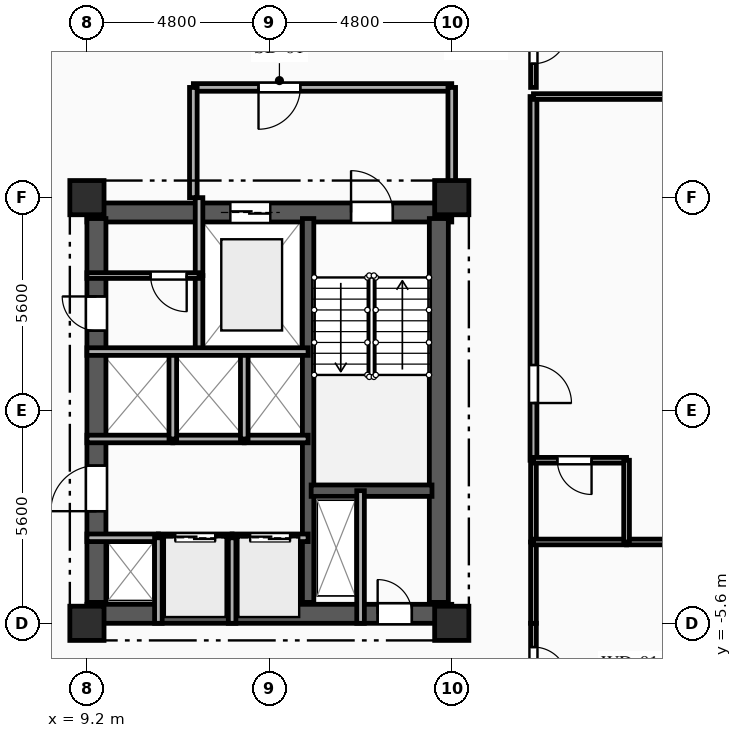
"""IFC4 building model, lengths in metres.
Left out: names, types, materials, properties, quantities, classifications, styles, units other than length and angle.
Written with IfcOpenShell. Run it as: python <this file> out.ifc"""

import sys

from ifc_helpers import new_model, si_unit, direction, frame, frame_2d, origin, origin_2d, place, context, subcontext, project, spatial, rectangle, extrude, element, fill, save


model = new_model("IFC4")
c1 = context("Model", 3, precision=1e-05, world=origin(), true_north=direction((0.0, 1.0)))
c2 = subcontext(c1, "Body", "Model", "MODEL_VIEW")
j1 = project(units=[si_unit("LENGTHUNIT", "METRE"), si_unit("PLANEANGLEUNIT", "RADIAN")], contexts=[c1])
p1 = place(None, origin())
s1 = spatial("IfcSite", under=j1, at=p1, CompositionType="ELEMENT")
p2 = place(p1, origin())
s2 = spatial("IfcBuilding", under=s1, at=p2, CompositionType="ELEMENT")
p3 = place(p2, frame((0.0, 0.0, 154.45)))
s3 = spatial("IfcBuildingStorey", under=s2, at=p3, CompositionType="ELEMENT", Elevation=154.45)
for number, where, z_axis, x_axis in (
    (1, (9.2, -5.6, 0.0), (0.0, 0.0, 1.0), (1.0, 0.0, 0.0)),
    (2, (9.2, 5.6, 0.0), (0.0, 0.0, 1.0), (1.0, 0.0, 0.0)),
    (3, (18.8, -5.6, 0.0), (0.0, 0.0, 1.0), (1.0, 0.0, 0.0)),
    (4, (18.8, 5.6, 0.0), (0.0, 0.0, 1.0), (1.0, 0.0, 0.0)),
):
    element("IfcColumn", number, at=place(p3, frame(where, z_axis=z_axis, x_axis=x_axis)), inside=s3, PredefinedType="COLUMN", context=c2, shape_type="SweptSolid", body=[
        extrude(rectangle(XDim=0.9, YDim=0.9, at=origin_2d()), origin(), (0.0, 0.0, 1.0), 3.35),
    ])
p4 = place(p3, frame((9.2, 5.21, 0.0), z_axis=(0.0, 0.0, 1.0), x_axis=(1.0, 0.0, 0.0)))
e5 = element("IfcWall", 5, at=p4, inside=s3, PredefinedType="SHEAR", context=c2, shape_type="SweptSolid", body=[
    extrude(rectangle(XDim=9.6, YDim=0.5, at=frame_2d((4.8, 0.0))), origin(), (0.0, 0.0, 1.0), 3.04),
])
p5 = place(p4, frame((6.95, 0.0, 0.0)))
e6 = element("IfcOpeningElement", 6, at=p5, cuts=e5, PredefinedType="OPENING", context=c2, shape_type="SweptSolid", body=[
    extrude(rectangle(XDim=1.1, YDim=2.15, at=frame_2d((0.55, 1.075))), frame((0.0, 0.26, 0.0), z_axis=(0.0, -1.0, 0.0), x_axis=(1.0, 0.0, 0.0)), (0.0, 0.0, 1.0), 0.52),
])
p6 = place(p4, frame((3.775, 0.0, 0.0)))
e7 = element("IfcOpeningElement", 7, at=p6, cuts=e5, PredefinedType="OPENING", context=c2, shape_type="SweptSolid", body=[
    extrude(rectangle(XDim=1.05, YDim=2.1, at=frame_2d((0.525, 1.05))), frame((0.0, 0.26, 0.0), z_axis=(0.0, -1.0, 0.0), x_axis=(1.0, 0.0, 0.0)), (0.0, 0.0, 1.0), 0.52),
])
p7 = place(p3, frame((9.2, -5.35, 0.0), z_axis=(0.0, 0.0, 1.0), x_axis=(1.0, 0.0, 0.0)))
e8 = element("IfcWall", 8, at=p7, inside=s3, PredefinedType="SHEAR", context=c2, shape_type="SweptSolid", body=[
    extrude(rectangle(XDim=9.6, YDim=0.5, at=frame_2d((4.8, 0.0))), origin(), (0.0, 0.0, 1.0), 3.04),
])
p8 = place(p7, frame((7.65, 0.0, 0.0)))
e9 = element("IfcOpeningElement", 9, at=p8, cuts=e8, PredefinedType="OPENING", context=c2, shape_type="SweptSolid", body=[
    extrude(rectangle(XDim=0.9, YDim=2.1, at=frame_2d((0.45, 1.05))), frame((0.0, 0.26, 0.0), z_axis=(0.0, -1.0, 0.0), x_axis=(1.0, 0.0, 0.0)), (0.0, 0.0, 1.0), 0.52),
])
p9 = place(p3, frame((9.45, -5.05, 0.0), z_axis=(0.0, 0.0, 1.0), x_axis=(0.0, 1.0, 0.0)))
e10 = element("IfcWall", 10, at=p9, inside=s3, PredefinedType="SHEAR", context=c2, shape_type="SweptSolid", body=[
    extrude(rectangle(XDim=10.1, YDim=0.5, at=frame_2d((5.05, 0.0))), origin(), (0.0, 0.0, 1.0), 3.04),
])
p10 = place(p9, frame((7.15, 0.0, 0.0)))
e11 = element("IfcOpeningElement", 11, at=p10, cuts=e10, PredefinedType="OPENING", context=c2, shape_type="SweptSolid", body=[
    extrude(rectangle(XDim=0.9, YDim=2.1, at=frame_2d((0.45, 1.05))), frame((0.0, 0.26, 0.0), z_axis=(0.0, -1.0, 0.0), x_axis=(1.0, 0.0, 0.0)), (0.0, 0.0, 1.0), 0.52),
])
p11 = place(p9, frame((2.4, 0.0, 0.0)))
e12 = element("IfcOpeningElement", 12, at=p11, cuts=e10, PredefinedType="OPENING", context=c2, shape_type="SweptSolid", body=[
    extrude(rectangle(XDim=1.2, YDim=2.15, at=frame_2d((0.6, 1.075))), frame((0.0, 0.26, 0.0), z_axis=(0.0, -1.0, 0.0), x_axis=(1.0, 0.0, 0.0)), (0.0, 0.0, 1.0), 0.52),
])
p12 = place(p3, frame((18.46, -5.05, 0.0), z_axis=(0.0, 0.0, 1.0), x_axis=(0.0, 1.0, 0.0)))
e13 = element("IfcWall", 13, at=p12, inside=s3, PredefinedType="SHEAR", context=c2, shape_type="SweptSolid", body=[
    extrude(rectangle(XDim=10.1, YDim=0.5, at=frame_2d((5.05, 0.0))), origin(), (0.0, 0.0, 1.0), 3.04),
])
p13 = place(p3, frame((15.02, -5.05, 0.0), z_axis=(0.0, 0.0, 1.0), x_axis=(0.0, 1.0, 0.0)))
e14 = element("IfcWall", 14, at=p13, inside=s3, PredefinedType="SHEAR", context=c2, shape_type="SweptSolid", body=[
    extrude(rectangle(XDim=10.1, YDim=0.3, at=frame_2d((5.05, 0.0))), origin(), (0.0, 0.0, 1.0), 3.04),
])
p14 = place(p3, frame((15.1, -2.11, 0.0), z_axis=(0.0, 0.0, 1.0), x_axis=(1.0, 0.0, 0.0)))
e15 = element("IfcWall", 15, at=p14, inside=s3, PredefinedType="SHEAR", context=c2, shape_type="SweptSolid", body=[
    extrude(rectangle(XDim=3.18, YDim=0.3, at=frame_2d((1.59, 0.0))), origin(), (0.0, 0.0, 1.0), 3.04),
])
p15 = place(p3, frame((16.4, -2.11, 0.0), z_axis=(0.0, 0.0, 1.0), x_axis=(0.0, -1.0, 0.0)))
e16 = element("IfcWall", 16, at=p15, inside=s3, PredefinedType="PARTITIONING", context=c2, shape_type="SweptSolid", body=[
    extrude(rectangle(XDim=3.49, YDim=0.2, at=frame_2d((1.745, 0.0))), origin(), (0.0, 0.0, 1.0), 3.04),
])
p16 = place(p3, frame((12.15, 3.55, 0.0), z_axis=(0.0, 0.0, 1.0), x_axis=(0.0, -1.0, 0.0)))
e17 = element("IfcWall", 17, at=p16, inside=s3, PredefinedType="PARTITIONING", context=c2, shape_type="SweptSolid", body=[
    extrude(rectangle(XDim=2.0, YDim=0.2, at=frame_2d((1.0, 0.0))), origin(), (0.0, 0.0, 1.0), 3.04),
])
p17 = place(p3, frame((12.15, 5.6, 0.0), z_axis=(0.0, 0.0, 1.0), x_axis=(0.0, -1.0, 0.0)))
e18 = element("IfcWall", 18, at=p17, inside=s3, PredefinedType="PARTITIONING", context=c2, shape_type="SweptSolid", body=[
    extrude(rectangle(XDim=2.05, YDim=0.2, at=frame_2d((1.025, 0.0))), origin(), (0.0, 0.0, 1.0), 3.04),
])
p18 = place(p3, frame((18.8, 8.5, 0.0), z_axis=(0.0, 0.0, 1.0), x_axis=(-1.0, 0.0, 0.0)))
e19 = element("IfcWall", 19, at=p18, inside=s3, PredefinedType="PARTITIONING", context=c2, shape_type="SweptSolid", body=[
    extrude(rectangle(XDim=6.8, YDim=0.2, at=frame_2d((3.4, 0.0))), origin(), (0.0, 0.0, 1.0), 3.04),
])
p19 = place(p18, frame((3.985, 0.0, 0.0)))
e20 = element("IfcOpeningElement", 20, at=p19, cuts=e19, PredefinedType="OPENING", context=c2, shape_type="SweptSolid", body=[
    extrude(rectangle(XDim=1.1, YDim=2.15, at=frame_2d((0.55, 1.075))), frame((0.0, 0.11, 0.0), z_axis=(0.0, -1.0, 0.0), x_axis=(1.0, 0.0, 0.0)), (0.0, 0.0, 1.0), 0.22),
])
p20 = place(p3, frame((18.8, 5.6, 0.0), z_axis=(0.0, 0.0, 1.0), x_axis=(0.0, 1.0, 0.0)))
e21 = element("IfcWall", 21, at=p20, inside=s3, PredefinedType="PARTITIONING", context=c2, shape_type="SweptSolid", body=[
    extrude(rectangle(XDim=2.9, YDim=0.2, at=frame_2d((1.45, 0.0))), origin(), (0.0, 0.0, 1.0), 2.525),
])
p21 = place(p3, frame((12.0, 8.5, 0.0), z_axis=(0.0, 0.0, 1.0), x_axis=(0.0, -1.0, 0.0)))
e22 = element("IfcWall", 22, at=p21, inside=s3, PredefinedType="PARTITIONING", context=c2, shape_type="SweptSolid", body=[
    extrude(rectangle(XDim=2.9, YDim=0.2, at=frame_2d((1.45, 0.0))), origin(), (0.0, 0.0, 1.0), 3.04),
])
p22 = place(p3, frame((12.15, 3.55, 0.0), z_axis=(0.0, 0.0, 1.0), x_axis=(-1.0, 0.0, 0.0)))
e23 = element("IfcWall", 23, at=p22, inside=s3, PredefinedType="PARTITIONING", context=c2, shape_type="SweptSolid", body=[
    extrude(rectangle(XDim=2.95, YDim=0.15, at=frame_2d((1.475, 0.0))), origin(), (0.0, 0.0, 1.0), 3.04),
])
p23 = place(p22, frame((0.325, 0.0, 0.0)))
e24 = element("IfcOpeningElement", 24, at=p23, cuts=e23, PredefinedType="OPENING", context=c2, shape_type="SweptSolid", body=[
    extrude(rectangle(XDim=0.95, YDim=2.1, at=frame_2d((0.475, 1.05))), frame((0.0, 0.085, 0.0), z_axis=(0.0, -1.0, 0.0), x_axis=(1.0, 0.0, 0.0)), (0.0, 0.0, 1.0), 0.17),
])
p24 = place(p3, frame((9.2, -3.35, 0.0), z_axis=(0.0, 0.0, 1.0), x_axis=(1.0, 0.0, 0.0)))
e25 = element("IfcWall", 25, at=p24, inside=s3, PredefinedType="PARTITIONING", context=c2, shape_type="SweptSolid", body=[
    extrude(rectangle(XDim=1.88, YDim=0.2, at=frame_2d((0.94, 0.0))), origin(), (0.0, 0.0, 1.0), 2.755),
])
p25 = place(p3, frame((11.08, -3.35, 0.0), z_axis=(0.0, 0.0, 1.0), x_axis=(1.0, 0.0, 0.0)))
e26 = element("IfcWall", 26, at=p25, inside=s3, PredefinedType="PARTITIONING", context=c2, shape_type="SweptSolid", body=[
    extrude(rectangle(XDim=1.94, YDim=0.2, at=frame_2d((0.97, 0.0))), origin(), (0.0, 0.0, 1.0), 3.04),
])
p26 = place(p25, frame((0.445, 0.0, 0.0)))
e27 = element("IfcOpeningElement", 27, at=p26, cuts=e26, PredefinedType="OPENING", context=c2, shape_type="SweptSolid", body=[
    extrude(rectangle(XDim=1.05, YDim=2.1, at=frame_2d((0.525, 1.05))), frame((0.0, 0.11, 0.0), z_axis=(0.0, -1.0, 0.0), x_axis=(1.0, 0.0, 0.0)), (0.0, 0.0, 1.0), 0.22),
])
p27 = place(p3, frame((13.02, -3.35, 0.0), z_axis=(0.0, 0.0, 1.0), x_axis=(1.0, 0.0, 0.0)))
e28 = element("IfcWall", 28, at=p27, inside=s3, PredefinedType="PARTITIONING", context=c2, shape_type="SweptSolid", body=[
    extrude(rectangle(XDim=2.0, YDim=0.2, at=frame_2d((1.0, 0.0))), origin(), (0.0, 0.0, 1.0), 3.04),
])
p28 = place(p27, frame((0.475, 0.0, 0.0)))
e29 = element("IfcOpeningElement", 29, at=p28, cuts=e28, PredefinedType="OPENING", context=c2, shape_type="SweptSolid", body=[
    extrude(rectangle(XDim=1.05, YDim=2.1, at=frame_2d((0.525, 1.05))), frame((0.0, 0.11, 0.0), z_axis=(0.0, -1.0, 0.0), x_axis=(1.0, 0.0, 0.0)), (0.0, 0.0, 1.0), 0.22),
])
p29 = place(p3, frame((11.46, -0.75, 0.0), z_axis=(0.0, 0.0, 1.0), x_axis=(-1.0, 0.0, 0.0)))
e30 = element("IfcWall", 30, at=p29, inside=s3, PredefinedType="PARTITIONING", context=c2, shape_type="SweptSolid", body=[
    extrude(rectangle(XDim=2.26, YDim=0.2, at=frame_2d((1.13, 0.0))), origin(), (0.0, 0.0, 1.0), 3.04),
])
p30 = place(p3, frame((13.34, -0.75, 0.0), z_axis=(0.0, 0.0, 1.0), x_axis=(-1.0, 0.0, 0.0)))
e31 = element("IfcWall", 31, at=p30, inside=s3, PredefinedType="PARTITIONING", context=c2, shape_type="SweptSolid", body=[
    extrude(rectangle(XDim=1.88, YDim=0.2, at=frame_2d((0.94, 0.0))), origin(), (0.0, 0.0, 1.0), 3.04),
])
p31 = place(p3, frame((15.02, -0.75, 0.0), z_axis=(0.0, 0.0, 1.0), x_axis=(-1.0, 0.0, 0.0)))
e32 = element("IfcWall", 32, at=p31, inside=s3, PredefinedType="PARTITIONING", context=c2, shape_type="SweptSolid", body=[
    extrude(rectangle(XDim=1.68, YDim=0.2, at=frame_2d((0.84, 0.0))), origin(), (0.0, 0.0, 1.0), 3.04),
])
for number, where, z_axis, x_axis in (
    (33, (11.08, -5.6, 0.0), (0.0, 0.0, 1.0), (0.0, 1.0, 0.0)),
    (34, (13.02, -5.6, 0.0), (0.0, 0.0, 1.0), (0.0, 1.0, 0.0)),
):
    element("IfcWall", number, at=place(p3, frame(where, z_axis=z_axis, x_axis=x_axis)), inside=s3, PredefinedType="PARTITIONING", context=c2, shape_type="SweptSolid", body=[
        extrude(rectangle(XDim=2.25, YDim=0.2, at=frame_2d((1.125, 0.0))), origin(), (0.0, 0.0, 1.0), 3.04),
    ])
for number, where, z_axis, x_axis in (
    (35, (11.46, -0.75, 0.0), (0.0, 0.0, 1.0), (0.0, 1.0, 0.0)),
    (36, (13.34, -0.75, 0.0), (0.0, 0.0, 1.0), (0.0, 1.0, 0.0)),
):
    element("IfcWall", number, at=place(p3, frame(where, z_axis=z_axis, x_axis=x_axis)), inside=s3, PredefinedType="PARTITIONING", context=c2, shape_type="SweptSolid", body=[
        extrude(rectangle(XDim=2.3, YDim=0.2, at=frame_2d((1.15, 0.0))), origin(), (0.0, 0.0, 1.0), 3.04),
    ])
p32 = place(p3, frame((20.95, 10.65, 0.0), z_axis=(0.0, 0.0, 1.0), x_axis=(0.0, -1.0, 0.0)))
e37 = element("IfcWall", 37, at=p32, inside=s3, PredefinedType="PARTITIONING", context=c2, shape_type="SweptSolid", body=[
    extrude(rectangle(XDim=2.15, YDim=0.15, at=frame_2d((1.075, 0.0))), origin(), (0.0, 0.0, 1.0), 3.04),
])
p33 = place(p32, frame((0.625, 0.0, 0.0)))
e38 = element("IfcOpeningElement", 38, at=p33, cuts=e37, PredefinedType="OPENING", context=c2, shape_type="SweptSolid", body=[
    extrude(rectangle(XDim=0.9, YDim=2.1, at=frame_2d((0.45, 1.05))), frame((0.0, 0.085, 0.0), z_axis=(0.0, -1.0, 0.0), x_axis=(1.0, 0.0, 0.0)), (0.0, 0.0, 1.0), 0.17),
])
p34 = place(p3, frame((20.95, -5.6, 0.0), z_axis=(0.0, 0.0, 1.0), x_axis=(0.0, -1.0, 0.0)))
e39 = element("IfcWall", 39, at=p34, inside=s3, PredefinedType="PARTITIONING", context=c2, shape_type="SweptSolid", body=[
    extrude(rectangle(XDim=2.15, YDim=0.15, at=frame_2d((1.075, 0.0))), origin(), (0.0, 0.0, 1.0), 3.04),
])
p35 = place(p34, frame((0.625, 0.0, 0.0)))
e40 = element("IfcOpeningElement", 40, at=p35, cuts=e39, PredefinedType="OPENING", context=c2, shape_type="SweptSolid", body=[
    extrude(rectangle(XDim=0.9, YDim=2.1, at=frame_2d((0.45, 1.05))), frame((0.0, 0.085, 0.0), z_axis=(0.0, -1.0, 0.0), x_axis=(1.0, 0.0, 0.0)), (0.0, 0.0, 1.0), 0.17),
])
p36 = place(p3, frame((20.95, -3.46, 0.0), z_axis=(0.0, 0.0, 1.0), x_axis=(0.0, -1.0, 0.0)))
e41 = element("IfcWall", 41, at=p36, inside=s3, PredefinedType="PARTITIONING", context=c2, shape_type="SweptSolid", body=[
    extrude(rectangle(XDim=2.14, YDim=0.15, at=frame_2d((1.07, 0.0))), origin(), (0.0, 0.0, 1.0), 3.04),
])
p37 = place(p3, frame((20.95, 8.26, 0.0), z_axis=(0.0, 0.0, 1.0), x_axis=(0.0, -1.0, 0.0)))
e42 = element("IfcWall", 42, at=p37, inside=s3, PredefinedType="PARTITIONING", context=c2, shape_type="SweptSolid", body=[
    extrude(rectangle(XDim=9.57, YDim=0.18, at=frame_2d((4.785, 0.0))), origin(), (0.0, 0.0, 1.0), 3.04),
])
p38 = place(p37, frame((7.064, 0.0, 0.0)))
e43 = element("IfcOpeningElement", 43, at=p38, cuts=e42, PredefinedType="OPENING", context=c2, shape_type="SweptSolid", body=[
    extrude(rectangle(XDim=1.0, YDim=2.15, at=frame_2d((0.5, 1.075))), frame((0.0, 0.1, 0.0), z_axis=(0.0, -1.0, 0.0), x_axis=(1.0, 0.0, 0.0)), (0.0, 0.0, 1.0), 0.2),
])
p39 = place(p3, frame((20.95, -1.31, 0.0), z_axis=(0.0, 0.0, 1.0), x_axis=(0.0, -1.0, 0.0)))
e44 = element("IfcWall", 44, at=p39, inside=s3, PredefinedType="PLUMBINGWALL", context=c2, shape_type="SweptSolid", body=[
    extrude(rectangle(XDim=2.15, YDim=0.15, at=frame_2d((1.075, 0.0))), origin(), (0.0, 0.0, 1.0), 3.04),
])
p40 = place(p3, frame((23.4, -3.46, 0.0), z_axis=(0.0, 0.0, 1.0), x_axis=(1.0, 0.0, 0.0)))
e45 = element("IfcWall", 45, at=p40, inside=s3, PredefinedType="PARTITIONING", context=c2, shape_type="SweptSolid", body=[
    extrude(rectangle(XDim=3.6, YDim=0.15, at=frame_2d((1.8, 0.0))), origin(), (0.0, 0.0, 1.0), 3.04),
])
p41 = place(p3, frame((20.95, -3.46, 0.0), z_axis=(0.0, 0.0, 1.0), x_axis=(1.0, 0.0, 0.0)))
e46 = element("IfcWall", 46, at=p41, inside=s3, PredefinedType="PLUMBINGWALL", context=c2, shape_type="SweptSolid", body=[
    extrude(rectangle(XDim=2.45, YDim=0.15, at=frame_2d((1.225, 0.0))), origin(), (0.0, 0.0, 1.0), 3.04),
])
p42 = place(p3, frame((23.4, -1.31, 0.0), z_axis=(0.0, 0.0, 1.0), x_axis=(-1.0, 0.0, 0.0)))
e47 = element("IfcWall", 47, at=p42, inside=s3, PredefinedType="PLUMBINGWALL", context=c2, shape_type="SweptSolid", body=[
    extrude(rectangle(XDim=2.45, YDim=0.15, at=frame_2d((1.225, 0.0))), origin(), (0.0, 0.0, 1.0), 3.04),
])
p43 = place(p42, frame((0.921, 0.0, 0.0)))
e48 = element("IfcOpeningElement", 48, at=p43, cuts=e47, PredefinedType="OPENING", context=c2, shape_type="SweptSolid", body=[
    extrude(rectangle(XDim=0.9, YDim=2.1, at=frame_2d((0.45, 1.05))), frame((0.0, 0.085, 0.0), z_axis=(0.0, -1.0, 0.0), x_axis=(1.0, 0.0, 0.0)), (0.0, 0.0, 1.0), 0.17),
])
p44 = place(p3, frame((23.4, -3.46, 0.0), z_axis=(0.0, 0.0, 1.0), x_axis=(0.0, 1.0, 0.0)))
e49 = element("IfcWall", 49, at=p44, inside=s3, PredefinedType="PLUMBINGWALL", context=c2, shape_type="SweptSolid", body=[
    extrude(rectangle(XDim=2.15, YDim=0.15, at=frame_2d((1.075, 0.0))), origin(), (0.0, 0.0, 1.0), 3.04),
])
p45 = place(p3, frame((20.95, 8.26, 0.0), z_axis=(0.0, 0.0, 1.0), x_axis=(1.0, 0.0, 0.0)))
e50 = element("IfcWall", 50, at=p45, inside=s3, PredefinedType="PARTITIONING", context=c2, shape_type="SweptSolid", body=[
    extrude(rectangle(XDim=6.05, YDim=0.15, at=frame_2d((3.025, 0.0))), origin(), (0.0, 0.0, 1.0), 3.04),
])
p46 = place(p3, frame((9.2, 1.55, 0.0), z_axis=(0.0, 0.0, 1.0), x_axis=(1.0, 0.0, 0.0)))
e51 = element("IfcWall", 51, at=p46, inside=s3, PredefinedType="PARTITIONING", context=c2, shape_type="SweptSolid", body=[
    extrude(rectangle(XDim=5.82, YDim=0.2, at=frame_2d((2.91, 0.0))), origin(), (0.0, 0.0, 1.0), 3.04),
])
p47 = place(p5, origin())
e52 = element("IfcDoor", 52, at=p47, inside=s3, OperationType="SINGLE_SWING_LEFT", PredefinedType="DOOR", context=c2, shape_type="SweptSolid", body=[
    extrude(rectangle(XDim=1.1, YDim=2.15, at=frame_2d((0.55, 1.075))), frame((0.0, 0.025, 0.0), z_axis=(0.0, -1.0, 0.0), x_axis=(1.0, 0.0, 0.0)), (0.0, 0.0, 1.0), 0.05),
])
fill(e6, e52)
p48 = place(p6, origin())
e53 = element("IfcDoor", 53, at=p48, inside=s3, OperationType="DOUBLE_DOOR_SLIDING", PredefinedType="DOOR", context=c2, shape_type="SweptSolid", body=[
    extrude(rectangle(XDim=1.05, YDim=2.1, at=frame_2d((0.525, 1.05))), frame((0.0, 0.025, 0.0), z_axis=(0.0, -1.0, 0.0), x_axis=(1.0, 0.0, 0.0)), (0.0, 0.0, 1.0), 0.05),
])
fill(e7, e53)
p49 = place(p8, origin())
e54 = element("IfcDoor", 54, at=p49, inside=s3, OperationType="SINGLE_SWING_LEFT", PredefinedType="DOOR", context=c2, shape_type="SweptSolid", body=[
    extrude(rectangle(XDim=0.9, YDim=2.1, at=frame_2d((0.45, 1.05))), frame((0.0, 0.025, 0.0), z_axis=(0.0, -1.0, 0.0), x_axis=(1.0, 0.0, 0.0)), (0.0, 0.0, 1.0), 0.05),
])
fill(e9, e54)
p50 = place(p19, origin())
e55 = element("IfcDoor", 55, at=p50, inside=s3, OperationType="SINGLE_SWING_RIGHT", PredefinedType="DOOR", context=c2, shape_type="SweptSolid", body=[
    extrude(rectangle(XDim=1.1, YDim=2.15, at=frame_2d((0.55, 1.075))), frame((0.0, 0.025, 0.0), z_axis=(0.0, -1.0, 0.0), x_axis=(1.0, 0.0, 0.0)), (0.0, 0.0, 1.0), 0.05),
])
fill(e20, e55)
p51 = place(p23, origin())
e56 = element("IfcDoor", 56, at=p51, inside=s3, OperationType="SINGLE_SWING_LEFT", PredefinedType="DOOR", context=c2, shape_type="SweptSolid", body=[
    extrude(rectangle(XDim=0.95, YDim=2.1, at=frame_2d((0.475, 1.05))), frame((0.0, 0.025, 0.0), z_axis=(0.0, -1.0, 0.0), x_axis=(1.0, 0.0, 0.0)), (0.0, 0.0, 1.0), 0.05),
])
fill(e24, e56)
p52 = place(p10, origin())
e57 = element("IfcDoor", 57, at=p52, inside=s3, OperationType="SINGLE_SWING_RIGHT", PredefinedType="DOOR", context=c2, shape_type="SweptSolid", body=[
    extrude(rectangle(XDim=0.9, YDim=2.1, at=frame_2d((0.45, 1.05))), frame((0.0, 0.025, 0.0), z_axis=(0.0, -1.0, 0.0), x_axis=(1.0, 0.0, 0.0)), (0.0, 0.0, 1.0), 0.05),
])
fill(e11, e57)
p53 = place(p26, origin())
e58 = element("IfcDoor", 58, at=p53, inside=s3, OperationType="DOUBLE_DOOR_SLIDING", PredefinedType="DOOR", context=c2, shape_type="SweptSolid", body=[
    extrude(rectangle(XDim=1.05, YDim=2.1, at=frame_2d((0.525, 1.05))), frame((0.0, 0.025, 0.0), z_axis=(0.0, -1.0, 0.0), x_axis=(1.0, 0.0, 0.0)), (0.0, 0.0, 1.0), 0.05),
])
fill(e27, e58)
p54 = place(p28, origin())
e59 = element("IfcDoor", 59, at=p54, inside=s3, OperationType="DOUBLE_DOOR_SLIDING", PredefinedType="DOOR", context=c2, shape_type="SweptSolid", body=[
    extrude(rectangle(XDim=1.05, YDim=2.1, at=frame_2d((0.525, 1.05))), frame((0.0, 0.025, 0.0), z_axis=(0.0, -1.0, 0.0), x_axis=(1.0, 0.0, 0.0)), (0.0, 0.0, 1.0), 0.05),
])
fill(e29, e59)
p55 = place(p11, origin())
e60 = element("IfcDoor", 60, at=p55, inside=s3, OperationType="SINGLE_SWING_LEFT", PredefinedType="DOOR", context=c2, shape_type="SweptSolid", body=[
    extrude(rectangle(XDim=1.2, YDim=2.15, at=frame_2d((0.6, 1.075))), frame((0.0, 0.025, 0.0), z_axis=(0.0, -1.0, 0.0), x_axis=(1.0, 0.0, 0.0)), (0.0, 0.0, 1.0), 0.05),
])
fill(e12, e60)
p56 = place(p33, origin())
e61 = element("IfcDoor", 61, at=p56, inside=s3, OperationType="SINGLE_SWING_LEFT", PredefinedType="DOOR", context=c2, shape_type="SweptSolid", body=[
    extrude(rectangle(XDim=0.9, YDim=2.1, at=frame_2d((0.45, 1.05))), frame((0.0, 0.025, 0.0), z_axis=(0.0, -1.0, 0.0), x_axis=(1.0, 0.0, 0.0)), (0.0, 0.0, 1.0), 0.05),
])
fill(e38, e61)
p57 = place(p35, origin())
e62 = element("IfcDoor", 62, at=p57, inside=s3, OperationType="SINGLE_SWING_RIGHT", PredefinedType="DOOR", context=c2, shape_type="SweptSolid", body=[
    extrude(rectangle(XDim=0.9, YDim=2.1, at=frame_2d((0.45, 1.05))), frame((0.0, 0.025, 0.0), z_axis=(0.0, -1.0, 0.0), x_axis=(1.0, 0.0, 0.0)), (0.0, 0.0, 1.0), 0.05),
])
fill(e40, e62)
p58 = place(p38, origin())
e63 = element("IfcDoor", 63, at=p58, inside=s3, OperationType="SINGLE_SWING_RIGHT", PredefinedType="DOOR", context=c2, shape_type="SweptSolid", body=[
    extrude(rectangle(XDim=1.0, YDim=2.15, at=frame_2d((0.5, 1.075))), frame((0.0, 0.025, 0.0), z_axis=(0.0, -1.0, 0.0), x_axis=(1.0, 0.0, 0.0)), (0.0, 0.0, 1.0), 0.05),
])
fill(e43, e63)
p59 = place(p43, origin())
e64 = element("IfcDoor", 64, at=p59, inside=s3, OperationType="SINGLE_SWING_LEFT", PredefinedType="DOOR", context=c2, shape_type="SweptSolid", body=[
    extrude(rectangle(XDim=0.9, YDim=2.1, at=frame_2d((0.45, 1.05))), frame((0.0, 0.025, 0.0), z_axis=(0.0, -1.0, 0.0), x_axis=(1.0, 0.0, 0.0)), (0.0, 0.0, 1.0), 0.05),
])
fill(e48, e64)
save(model, sys.argv[1])
